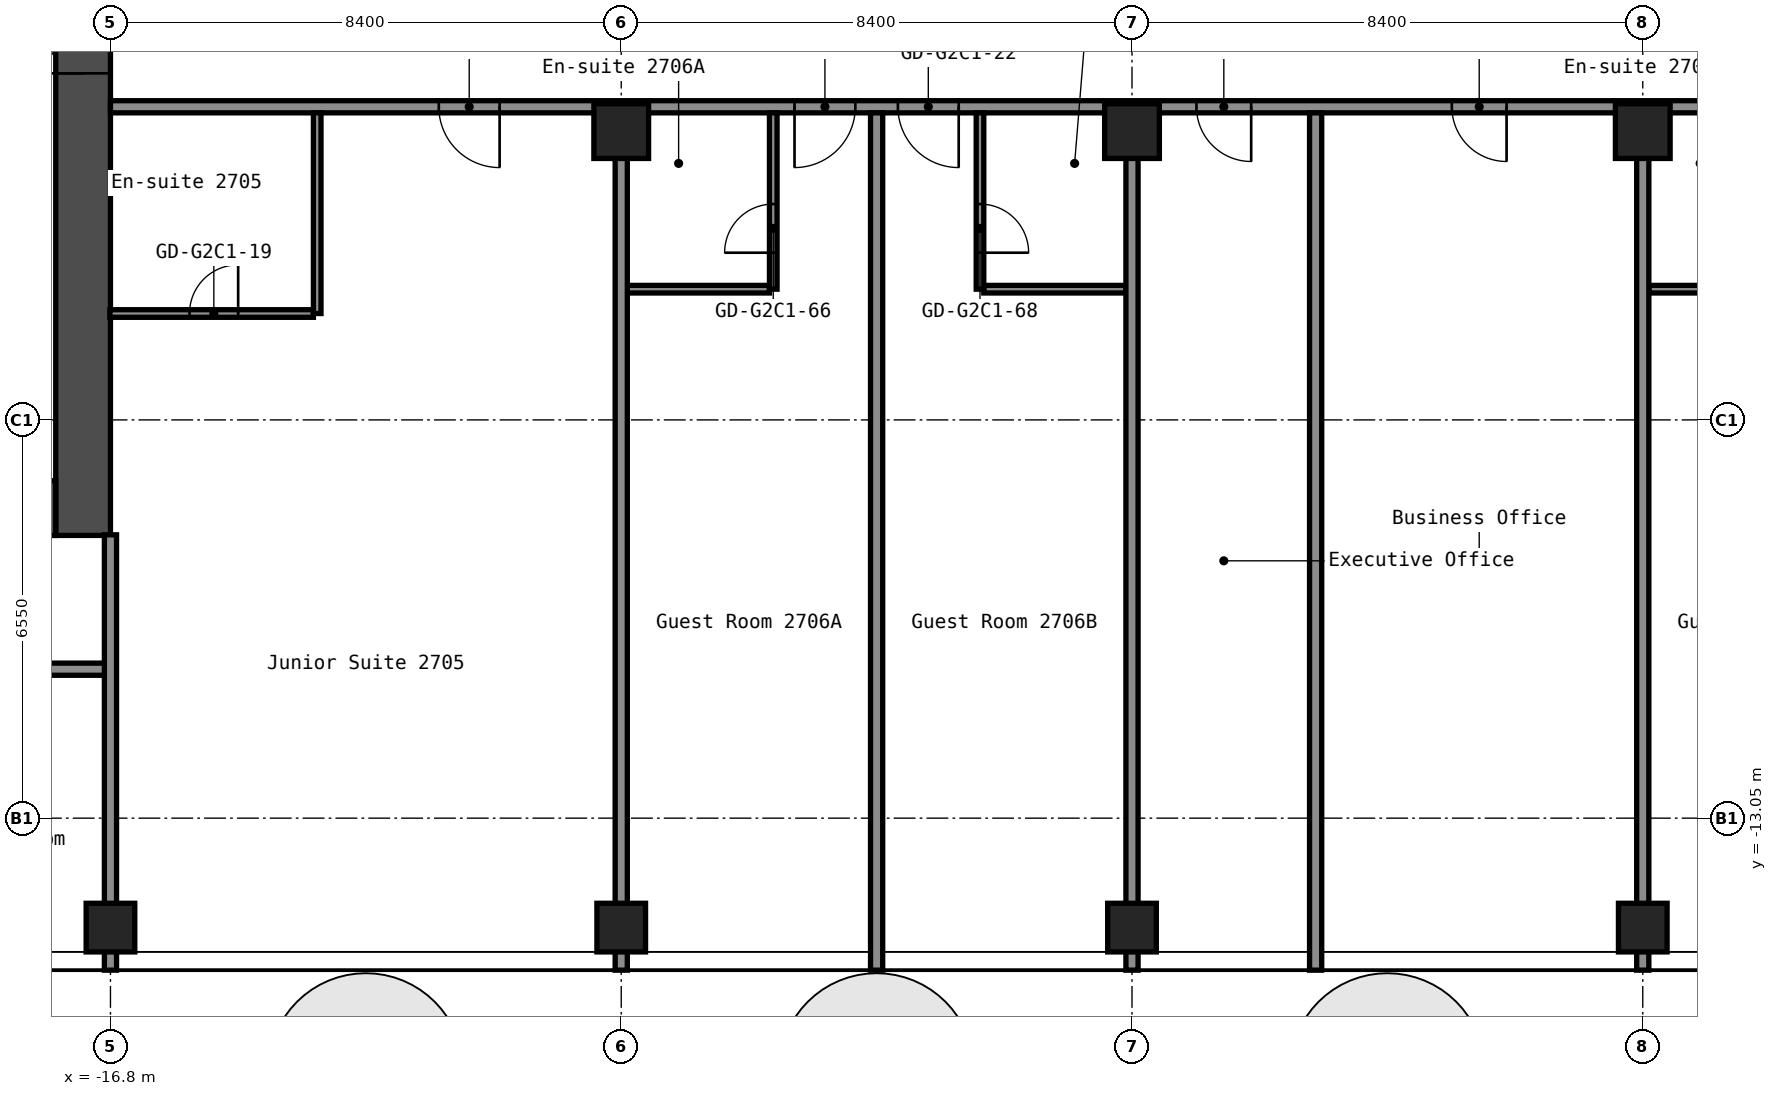
"""IFC4 building model, lengths in metres.
Left out: names, types, materials, properties, quantities, classifications, styles, units other than length and angle.
Written with IfcOpenShell. Run it as: python <this file> out.ifc"""

import sys

from ifc_helpers import new_model, si_unit, direction, frame, frame_2d, origin, origin_2d, place, context, subcontext, project, spatial, rectangle, hollow_rectangle, extrude, element, fill, save


model = new_model("IFC4")
c1 = context("Model", 3, precision=1e-05, world=origin(), true_north=direction((0.0, 1.0)))
c2 = subcontext(c1, "Body", "Model", "MODEL_VIEW")
j1 = project(units=[si_unit("LENGTHUNIT", "METRE"), si_unit("PLANEANGLEUNIT", "RADIAN")], contexts=[c1])
p1 = place(None, origin())
s1 = spatial("IfcSite", under=j1, at=p1, CompositionType="ELEMENT")
p2 = place(p1, origin())
s2 = spatial("IfcBuilding", under=s1, at=p2, CompositionType="ELEMENT")
p3 = place(p2, frame((0.0, 0.0, 97.8)))
s3 = spatial("IfcBuildingStorey", under=s2, at=p3, CompositionType="ELEMENT", Elevation=97.8)
for number, where, z_axis, x_axis in (
    (1, (-16.8, -14.85, 0.0), (0.0, 0.0, 1.0), (1.0, 0.0, 0.0)),
    (2, (-8.4, -14.85, 0.0), (0.0, 0.0, 1.0), (1.0, 0.0, 0.0)),
):
    element("IfcColumn", number, at=place(p3, frame(where, z_axis=z_axis, x_axis=x_axis)), inside=s3, PredefinedType="COLUMN", context=c2, shape_type="SweptSolid", body=[
        extrude(hollow_rectangle(XDim=0.8, YDim=0.8, WallThickness=0.032, at=origin_2d()), origin(), (0.0, 0.0, 1.0), 2.8),
    ])
p4 = place(p3, frame((-8.4, -1.75, 0.0), z_axis=(0.0, 0.0, 1.0), x_axis=(1.0, 0.0, 0.0)))
e3 = element("IfcColumn", 3, at=p4, inside=s3, PredefinedType="COLUMN", context=c2, shape_type="SweptSolid", body=[
    extrude(hollow_rectangle(XDim=0.9, YDim=0.9, WallThickness=0.036, at=origin_2d()), origin(), (0.0, 0.0, 1.0), 2.8),
])
p5 = place(p3, frame((0.0, -14.85, 0.0), z_axis=(0.0, 0.0, 1.0), x_axis=(1.0, 0.0, 0.0)))
e4 = element("IfcColumn", 4, at=p5, inside=s3, PredefinedType="COLUMN", context=c2, shape_type="SweptSolid", body=[
    extrude(hollow_rectangle(XDim=0.8, YDim=0.8, WallThickness=0.032, at=origin_2d()), origin(), (0.0, 0.0, 1.0), 2.8),
])
p6 = place(p3, frame((0.0, -1.75, 0.0), z_axis=(0.0, 0.0, 1.0), x_axis=(1.0, 0.0, 0.0)))
e5 = element("IfcColumn", 5, at=p6, inside=s3, PredefinedType="COLUMN", context=c2, shape_type="SweptSolid", body=[
    extrude(hollow_rectangle(XDim=0.9, YDim=0.9, WallThickness=0.036, at=origin_2d()), origin(), (0.0, 0.0, 1.0), 2.8),
])
p7 = place(p3, frame((8.4, -14.85, 0.0), z_axis=(0.0, 0.0, 1.0), x_axis=(1.0, 0.0, 0.0)))
e6 = element("IfcColumn", 6, at=p7, inside=s3, PredefinedType="COLUMN", context=c2, shape_type="SweptSolid", body=[
    extrude(hollow_rectangle(XDim=0.8, YDim=0.8, WallThickness=0.032, at=origin_2d()), origin(), (0.0, 0.0, 1.0), 2.8),
])
p8 = place(p3, frame((8.4, -1.75, 0.0), z_axis=(0.0, 0.0, 1.0), x_axis=(1.0, 0.0, 0.0)))
e7 = element("IfcColumn", 7, at=p8, inside=s3, PredefinedType="COLUMN", context=c2, shape_type="SweptSolid", body=[
    extrude(hollow_rectangle(XDim=0.9, YDim=0.9, WallThickness=0.036, at=origin_2d()), origin(), (0.0, 0.0, 1.0), 2.8),
])
p9 = place(p3, frame((-17.25, -8.4, 0.0), z_axis=(0.0, 0.0, 1.0), x_axis=(0.0, 1.0, 0.0)))
e8 = element("IfcWall", 8, at=p9, inside=s3, PredefinedType="SHEAR", context=c2, shape_type="SweptSolid", body=[
    extrude(rectangle(XDim=16.8, YDim=0.9, at=frame_2d((8.4, 0.0))), origin(), (0.0, 0.0, 1.0), 2.8),
])
p10 = place(p9, frame((7.6, 0.0, 0.0)))
e9 = element("IfcOpeningElement", 9, at=p10, cuts=e8, PredefinedType="OPENING", context=c2, shape_type="SweptSolid", body=[
    extrude(rectangle(XDim=1.2, YDim=2.1, at=frame_2d((0.6, 1.05))), frame((0.0, 0.46, 0.0), z_axis=(0.0, -1.0, 0.0), x_axis=(1.0, 0.0, 0.0)), (0.0, 0.0, 1.0), 0.92),
])
p11 = place(p3, frame((-32.7, -7.95, 0.0), z_axis=(0.0, 0.0, 1.0), x_axis=(1.0, 0.0, 0.0)))
e10 = element("IfcWall", 10, at=p11, inside=s3, PredefinedType="SHEAR", context=c2, shape_type="SweptSolid", body=[
    extrude(rectangle(XDim=15.0, YDim=0.9, at=frame_2d((7.5, 0.0))), origin(), (0.0, 0.0, 1.0), 2.8),
])
p12 = place(p11, frame((11.45, 0.0, 0.0)))
e11 = element("IfcOpeningElement", 11, at=p12, cuts=e10, PredefinedType="OPENING", context=c2, shape_type="SweptSolid", body=[
    extrude(rectangle(XDim=1.0, YDim=2.1, at=frame_2d((0.5, 1.05))), frame((0.0, 0.46, 0.0), z_axis=(0.0, -1.0, 0.0), x_axis=(1.0, 0.0, 0.0)), (0.0, 0.0, 1.0), 0.92),
])
p13 = place(p3, frame((-46.5, -10.6, 0.0), z_axis=(0.0, 0.0, 1.0), x_axis=(1.0, 0.0, 0.0)))
e12 = element("IfcWall", 12, at=p13, inside=s3, PredefinedType="PARTITIONING", context=c2, shape_type="SweptSolid", body=[
    extrude(rectangle(XDim=29.7, YDim=0.2, at=frame_2d((14.85, 0.0))), origin(), (0.0, 0.0, 1.0), 2.8),
])
p14 = place(p13, frame((1.95, 0.0, 0.0)))
e13 = element("IfcOpeningElement", 13, at=p14, cuts=e12, PredefinedType="OPENING", context=c2, shape_type="SweptSolid", body=[
    extrude(rectangle(XDim=0.9, YDim=2.1, at=frame_2d((0.45, 1.05))), frame((0.0, 0.11, 0.0), z_axis=(0.0, -1.0, 0.0), x_axis=(1.0, 0.0, 0.0)), (0.0, 0.0, 1.0), 0.22),
])
p15 = place(p13, frame((5.815, 0.0, 0.0)))
e14 = element("IfcOpeningElement", 14, at=p15, cuts=e12, PredefinedType="OPENING", context=c2, shape_type="SweptSolid", body=[
    extrude(rectangle(XDim=0.9, YDim=2.1, at=frame_2d((0.45, 1.05))), frame((0.0, 0.11, 0.0), z_axis=(0.0, -1.0, 0.0), x_axis=(1.0, 0.0, 0.0)), (0.0, 0.0, 1.0), 0.22),
])
p16 = place(p13, frame((10.015, 0.0, 0.0)))
e15 = element("IfcOpeningElement", 15, at=p16, cuts=e12, PredefinedType="OPENING", context=c2, shape_type="SweptSolid", body=[
    extrude(rectangle(XDim=0.9, YDim=2.1, at=frame_2d((0.45, 1.05))), frame((0.0, 0.11, 0.0), z_axis=(0.0, -1.0, 0.0), x_axis=(1.0, 0.0, 0.0)), (0.0, 0.0, 1.0), 0.22),
])
p17 = place(p13, frame((14.045, 0.0, 0.0)))
e16 = element("IfcOpeningElement", 16, at=p17, cuts=e12, PredefinedType="OPENING", context=c2, shape_type="SweptSolid", body=[
    extrude(rectangle(XDim=0.9, YDim=2.1, at=frame_2d((0.45, 1.05))), frame((0.0, 0.11, 0.0), z_axis=(0.0, -1.0, 0.0), x_axis=(1.0, 0.0, 0.0)), (0.0, 0.0, 1.0), 0.22),
])
p18 = place(p13, frame((18.245, 0.0, 0.0)))
e17 = element("IfcOpeningElement", 17, at=p18, cuts=e12, PredefinedType="OPENING", context=c2, shape_type="SweptSolid", body=[
    extrude(rectangle(XDim=0.9, YDim=2.1, at=frame_2d((0.45, 1.05))), frame((0.0, 0.11, 0.0), z_axis=(0.0, -1.0, 0.0), x_axis=(1.0, 0.0, 0.0)), (0.0, 0.0, 1.0), 0.22),
])
p19 = place(p13, frame((22.63, 0.0, 0.0)))
e18 = element("IfcOpeningElement", 18, at=p19, cuts=e12, PredefinedType="OPENING", context=c2, shape_type="SweptSolid", body=[
    extrude(rectangle(XDim=0.9, YDim=2.1, at=frame_2d((0.45, 1.05))), frame((0.0, 0.11, 0.0), z_axis=(0.0, -1.0, 0.0), x_axis=(1.0, 0.0, 0.0)), (0.0, 0.0, 1.0), 0.22),
])
p20 = place(p13, frame((26.83, 0.0, 0.0)))
e19 = element("IfcOpeningElement", 19, at=p20, cuts=e12, PredefinedType="OPENING", context=c2, shape_type="SweptSolid", body=[
    extrude(rectangle(XDim=0.9, YDim=2.1, at=frame_2d((0.45, 1.05))), frame((0.0, 0.11, 0.0), z_axis=(0.0, -1.0, 0.0), x_axis=(1.0, 0.0, 0.0)), (0.0, 0.0, 1.0), 0.22),
])
p21 = place(p3, frame((-16.81, -4.75, 0.0), z_axis=(0.0, 0.0, 1.0), x_axis=(1.0, 0.0, 0.0)))
e20 = element("IfcWall", 20, at=p21, inside=s3, PredefinedType="PARTITIONING", context=c2, shape_type="SweptSolid", body=[
    extrude(rectangle(XDim=3.348, YDim=0.125, at=frame_2d((1.674, 0.0))), origin(), (0.0, 0.0, 1.0), 2.8),
])
p22 = place(p21, frame((1.31, 0.0, 0.0)))
e21 = element("IfcOpeningElement", 21, at=p22, cuts=e20, PredefinedType="OPENING", context=c2, shape_type="SweptSolid", body=[
    extrude(rectangle(XDim=0.8, YDim=2.1, at=frame_2d((0.4, 1.05))), frame((0.0, 0.073, 0.0), z_axis=(0.0, -1.0, 0.0), x_axis=(1.0, 0.0, 0.0)), (0.0, 0.0, 1.0), 0.145),
])
p23 = place(p3, frame((-8.3, -4.35, 0.0), z_axis=(0.0, 0.0, 1.0), x_axis=(1.0, 0.0, 0.0)))
e22 = element("IfcWall", 22, at=p23, inside=s3, PredefinedType="PARTITIONING", context=c2, shape_type="SweptSolid", body=[
    extrude(rectangle(XDim=2.338, YDim=0.125, at=frame_2d((1.169, 0.0))), origin(), (0.0, 0.0, 1.0), 2.8),
])
for number, where, z_axis, x_axis in (
    (23, (-2.438, -4.35, 0.0), (0.0, 0.0, 1.0), (1.0, 0.0, 0.0)),
    (24, (8.5, -4.35, 0.0), (0.0, 0.0, 1.0), (1.0, 0.0, 0.0)),
):
    element("IfcWall", number, at=place(p3, frame(where, z_axis=z_axis, x_axis=x_axis)), inside=s3, PredefinedType="PARTITIONING", context=c2, shape_type="SweptSolid", body=[
        extrude(rectangle(XDim=2.337, YDim=0.125, at=frame_2d((1.169, 0.0))), origin(), (0.0, 0.0, 1.0), 2.8),
    ])
p24 = place(p3, frame((-16.8, -1.35, 0.0), z_axis=(0.0, 0.0, 1.0), x_axis=(1.0, 0.0, 0.0)))
e25 = element("IfcWall", 25, at=p24, inside=s3, PredefinedType="PARTITIONING", context=c2, shape_type="SweptSolid", body=[
    extrude(rectangle(XDim=33.6, YDim=0.2, at=frame_2d((16.8, 0.0))), origin(), (0.0, 0.0, 1.0), 2.8),
])
p25 = place(p24, frame((5.4, 0.0, 0.0)))
e26 = element("IfcOpeningElement", 26, at=p25, cuts=e25, PredefinedType="OPENING", context=c2, shape_type="SweptSolid", body=[
    extrude(rectangle(XDim=1.0, YDim=2.1, at=frame_2d((0.5, 1.05))), frame((0.0, 0.11, 0.0), z_axis=(0.0, -1.0, 0.0), x_axis=(1.0, 0.0, 0.0)), (0.0, 0.0, 1.0), 0.22),
])
p26 = place(p24, frame((11.25, 0.0, 0.0)))
e27 = element("IfcOpeningElement", 27, at=p26, cuts=e25, PredefinedType="OPENING", context=c2, shape_type="SweptSolid", body=[
    extrude(rectangle(XDim=1.0, YDim=2.1, at=frame_2d((0.5, 1.05))), frame((0.0, 0.11, 0.0), z_axis=(0.0, -1.0, 0.0), x_axis=(1.0, 0.0, 0.0)), (0.0, 0.0, 1.0), 0.22),
])
p27 = place(p24, frame((12.95, 0.0, 0.0)))
e28 = element("IfcOpeningElement", 28, at=p27, cuts=e25, PredefinedType="OPENING", context=c2, shape_type="SweptSolid", body=[
    extrude(rectangle(XDim=1.0, YDim=2.1, at=frame_2d((0.5, 1.05))), frame((0.0, 0.11, 0.0), z_axis=(0.0, -1.0, 0.0), x_axis=(1.0, 0.0, 0.0)), (0.0, 0.0, 1.0), 0.22),
])
p28 = place(p24, frame((17.86, 0.0, 0.0)))
e29 = element("IfcOpeningElement", 29, at=p28, cuts=e25, PredefinedType="OPENING", context=c2, shape_type="SweptSolid", body=[
    extrude(rectangle(XDim=0.9, YDim=2.1, at=frame_2d((0.45, 1.05))), frame((0.0, 0.11, 0.0), z_axis=(0.0, -1.0, 0.0), x_axis=(1.0, 0.0, 0.0)), (0.0, 0.0, 1.0), 0.22),
])
p29 = place(p24, frame((22.06, 0.0, 0.0)))
e30 = element("IfcOpeningElement", 30, at=p29, cuts=e25, PredefinedType="OPENING", context=c2, shape_type="SweptSolid", body=[
    extrude(rectangle(XDim=0.9, YDim=2.1, at=frame_2d((0.45, 1.05))), frame((0.0, 0.11, 0.0), z_axis=(0.0, -1.0, 0.0), x_axis=(1.0, 0.0, 0.0)), (0.0, 0.0, 1.0), 0.22),
])
p30 = place(p24, frame((28.05, 0.0, 0.0)))
e31 = element("IfcOpeningElement", 31, at=p30, cuts=e25, PredefinedType="OPENING", context=c2, shape_type="SweptSolid", body=[
    extrude(rectangle(XDim=1.0, YDim=2.1, at=frame_2d((0.5, 1.05))), frame((0.0, 0.11, 0.0), z_axis=(0.0, -1.0, 0.0), x_axis=(1.0, 0.0, 0.0)), (0.0, 0.0, 1.0), 0.22),
])
p31 = place(p24, frame((29.75, 0.0, 0.0)))
e32 = element("IfcOpeningElement", 32, at=p31, cuts=e25, PredefinedType="OPENING", context=c2, shape_type="SweptSolid", body=[
    extrude(rectangle(XDim=1.0, YDim=2.1, at=frame_2d((0.5, 1.05))), frame((0.0, 0.11, 0.0), z_axis=(0.0, -1.0, 0.0), x_axis=(1.0, 0.0, 0.0)), (0.0, 0.0, 1.0), 0.22),
])
p32 = place(p3, frame((-16.8, -15.55, 0.0), z_axis=(0.0, 0.0, 1.0), x_axis=(0.0, 1.0, 0.0)))
e33 = element("IfcWall", 33, at=p32, inside=s3, PredefinedType="PARTITIONING", context=c2, shape_type="SweptSolid", body=[
    extrude(rectangle(XDim=7.16, YDim=0.2, at=frame_2d((3.58, 0.0))), origin(), (0.0, 0.0, 1.0), 2.8),
])
p33 = place(p3, frame((-13.4, -4.75, 0.0), z_axis=(0.0, 0.0, 1.0), x_axis=(0.0, 1.0, 0.0)))
e34 = element("IfcWall", 34, at=p33, inside=s3, PredefinedType="PARTITIONING", context=c2, shape_type="SweptSolid", body=[
    extrude(rectangle(XDim=3.3, YDim=0.125, at=frame_2d((1.65, 0.0))), origin(), (0.0, 0.0, 1.0), 2.8),
])
p34 = place(p3, frame((-8.4, -15.55, 0.0), z_axis=(0.0, 0.0, 1.0), x_axis=(0.0, 1.0, 0.0)))
e35 = element("IfcWall", 35, at=p34, inside=s3, PredefinedType="PARTITIONING", context=c2, shape_type="SweptSolid", body=[
    extrude(rectangle(XDim=13.36, YDim=0.2, at=frame_2d((6.68, 0.0))), origin(), (0.0, 0.0, 1.0), 2.8),
])
p35 = place(p3, frame((-5.9, -4.35, 0.0), z_axis=(0.0, 0.0, 1.0), x_axis=(0.0, 1.0, 0.0)))
e36 = element("IfcWall", 36, at=p35, inside=s3, PredefinedType="PARTITIONING", context=c2, shape_type="SweptSolid", body=[
    extrude(rectangle(XDim=2.9, YDim=0.125, at=frame_2d((1.45, 0.0))), origin(), (0.0, 0.0, 1.0), 2.8),
])
p36 = place(p35, frame((0.6, 0.0, 0.0)))
e37 = element("IfcOpeningElement", 37, at=p36, cuts=e36, PredefinedType="OPENING", context=c2, shape_type="SweptSolid", body=[
    extrude(rectangle(XDim=0.8, YDim=2.1, at=frame_2d((0.4, 1.05))), frame((0.0, 0.073, 0.0), z_axis=(0.0, -1.0, 0.0), x_axis=(1.0, 0.0, 0.0)), (0.0, 0.0, 1.0), 0.145),
])
p37 = place(p3, frame((-4.2, -15.55, 0.0), z_axis=(0.0, 0.0, 1.0), x_axis=(0.0, 1.0, 0.0)))
e38 = element("IfcWall", 38, at=p37, inside=s3, PredefinedType="PARTITIONING", context=c2, shape_type="SweptSolid", body=[
    extrude(rectangle(XDim=14.1, YDim=0.2, at=frame_2d((7.05, 0.0))), origin(), (0.0, 0.0, 1.0), 2.8),
])
p38 = place(p3, frame((-2.5, -4.35, 0.0), z_axis=(0.0, 0.0, 1.0), x_axis=(0.0, 1.0, 0.0)))
e39 = element("IfcWall", 39, at=p38, inside=s3, PredefinedType="PARTITIONING", context=c2, shape_type="SweptSolid", body=[
    extrude(rectangle(XDim=2.9, YDim=0.125, at=frame_2d((1.45, 0.0))), origin(), (0.0, 0.0, 1.0), 2.8),
])
p39 = place(p38, frame((0.6, 0.0, 0.0)))
e40 = element("IfcOpeningElement", 40, at=p39, cuts=e39, PredefinedType="OPENING", context=c2, shape_type="SweptSolid", body=[
    extrude(rectangle(XDim=0.8, YDim=2.1, at=frame_2d((0.4, 1.05))), frame((0.0, 0.073, 0.0), z_axis=(0.0, -1.0, 0.0), x_axis=(1.0, 0.0, 0.0)), (0.0, 0.0, 1.0), 0.145),
])
p40 = place(p3, frame((0.0, -15.55, 0.0), z_axis=(0.0, 0.0, 1.0), x_axis=(0.0, 1.0, 0.0)))
e41 = element("IfcWall", 41, at=p40, inside=s3, PredefinedType="PARTITIONING", context=c2, shape_type="SweptSolid", body=[
    extrude(rectangle(XDim=13.36, YDim=0.2, at=frame_2d((6.68, 0.0))), origin(), (0.0, 0.0, 1.0), 2.8),
])
p41 = place(p3, frame((3.02, -15.55, 0.0), z_axis=(0.0, 0.0, 1.0), x_axis=(0.0, 1.0, 0.0)))
e42 = element("IfcWall", 42, at=p41, inside=s3, PredefinedType="PARTITIONING", context=c2, shape_type="SweptSolid", body=[
    extrude(rectangle(XDim=14.1, YDim=0.2, at=frame_2d((7.05, 0.0))), origin(), (0.0, 0.0, 1.0), 2.8),
])
p42 = place(p3, frame((8.4, -15.55, 0.0), z_axis=(0.0, 0.0, 1.0), x_axis=(0.0, 1.0, 0.0)))
e43 = element("IfcWall", 43, at=p42, inside=s3, PredefinedType="PARTITIONING", context=c2, shape_type="SweptSolid", body=[
    extrude(rectangle(XDim=13.36, YDim=0.2, at=frame_2d((6.68, 0.0))), origin(), (0.0, 0.0, 1.0), 2.8),
])
p43 = place(p10, origin())
e44 = element("IfcDoor", 44, at=p43, inside=s3, OperationType="DOUBLE_DOOR_SINGLE_SWING", PredefinedType="DOOR", context=c2, shape_type="SweptSolid", body=[
    extrude(rectangle(XDim=1.2, YDim=2.1, at=frame_2d((0.6, 1.05))), frame((0.0, 0.025, 0.0), z_axis=(0.0, -1.0, 0.0), x_axis=(1.0, 0.0, 0.0)), (0.0, 0.0, 1.0), 0.05),
])
fill(e9, e44)
p44 = place(p22, origin())
e45 = element("IfcDoor", 45, at=p44, inside=s3, OperationType="SINGLE_SWING_LEFT", PredefinedType="DOOR", context=c2, shape_type="SweptSolid", body=[
    extrude(rectangle(XDim=0.8, YDim=2.1, at=frame_2d((0.4, 1.05))), frame((0.0, 0.025, 0.0), z_axis=(0.0, -1.0, 0.0), x_axis=(1.0, 0.0, 0.0)), (0.0, 0.0, 1.0), 0.05),
])
fill(e21, e45)
p45 = place(p25, origin())
e46 = element("IfcDoor", 46, at=p45, inside=s3, OperationType="SINGLE_SWING_RIGHT", PredefinedType="DOOR", context=c2, shape_type="SweptSolid", body=[
    extrude(rectangle(XDim=1.0, YDim=2.1, at=frame_2d((0.5, 1.05))), frame((0.0, 0.025, 0.0), z_axis=(0.0, -1.0, 0.0), x_axis=(1.0, 0.0, 0.0)), (0.0, 0.0, 1.0), 0.05),
])
fill(e26, e46)
p46 = place(p26, origin())
e47 = element("IfcDoor", 47, at=p46, inside=s3, OperationType="SINGLE_SWING_LEFT", PredefinedType="DOOR", context=c2, shape_type="SweptSolid", body=[
    extrude(rectangle(XDim=1.0, YDim=2.1, at=frame_2d((0.5, 1.05))), frame((0.0, 0.025, 0.0), z_axis=(0.0, -1.0, 0.0), x_axis=(1.0, 0.0, 0.0)), (0.0, 0.0, 1.0), 0.05),
])
fill(e27, e47)
p47 = place(p27, origin())
e48 = element("IfcDoor", 48, at=p47, inside=s3, OperationType="SINGLE_SWING_RIGHT", PredefinedType="DOOR", context=c2, shape_type="SweptSolid", body=[
    extrude(rectangle(XDim=1.0, YDim=2.1, at=frame_2d((0.5, 1.05))), frame((0.0, 0.025, 0.0), z_axis=(0.0, -1.0, 0.0), x_axis=(1.0, 0.0, 0.0)), (0.0, 0.0, 1.0), 0.05),
])
fill(e28, e48)
p48 = place(p28, origin())
e49 = element("IfcDoor", 49, at=p48, inside=s3, OperationType="SINGLE_SWING_RIGHT", PredefinedType="DOOR", context=c2, shape_type="SweptSolid", body=[
    extrude(rectangle(XDim=0.9, YDim=2.1, at=frame_2d((0.45, 1.05))), frame((0.0, 0.025, 0.0), z_axis=(0.0, -1.0, 0.0), x_axis=(1.0, 0.0, 0.0)), (0.0, 0.0, 1.0), 0.05),
])
fill(e29, e49)
p49 = place(p29, origin())
e50 = element("IfcDoor", 50, at=p49, inside=s3, OperationType="SINGLE_SWING_RIGHT", PredefinedType="DOOR", context=c2, shape_type="SweptSolid", body=[
    extrude(rectangle(XDim=0.9, YDim=2.1, at=frame_2d((0.45, 1.05))), frame((0.0, 0.025, 0.0), z_axis=(0.0, -1.0, 0.0), x_axis=(1.0, 0.0, 0.0)), (0.0, 0.0, 1.0), 0.05),
])
fill(e30, e50)
p50 = place(p36, origin())
e51 = element("IfcDoor", 51, at=p50, inside=s3, OperationType="SINGLE_SWING_RIGHT", PredefinedType="DOOR", context=c2, shape_type="SweptSolid", body=[
    extrude(rectangle(XDim=0.8, YDim=2.1, at=frame_2d((0.4, 1.05))), frame((0.0, 0.025, 0.0), z_axis=(0.0, -1.0, 0.0), x_axis=(1.0, 0.0, 0.0)), (0.0, 0.0, 1.0), 0.05),
])
fill(e37, e51)
p51 = place(p39, origin())
e52 = element("IfcDoor", 52, at=p51, inside=s3, OperationType="SINGLE_SWING_LEFT", PredefinedType="DOOR", context=c2, shape_type="SweptSolid", body=[
    extrude(rectangle(XDim=0.8, YDim=2.1, at=frame_2d((0.4, 1.05))), frame((0.0, 0.025, 0.0), z_axis=(0.0, -1.0, 0.0), x_axis=(1.0, 0.0, 0.0)), (0.0, 0.0, 1.0), 0.05),
])
fill(e40, e52)
save(model, sys.argv[1])
